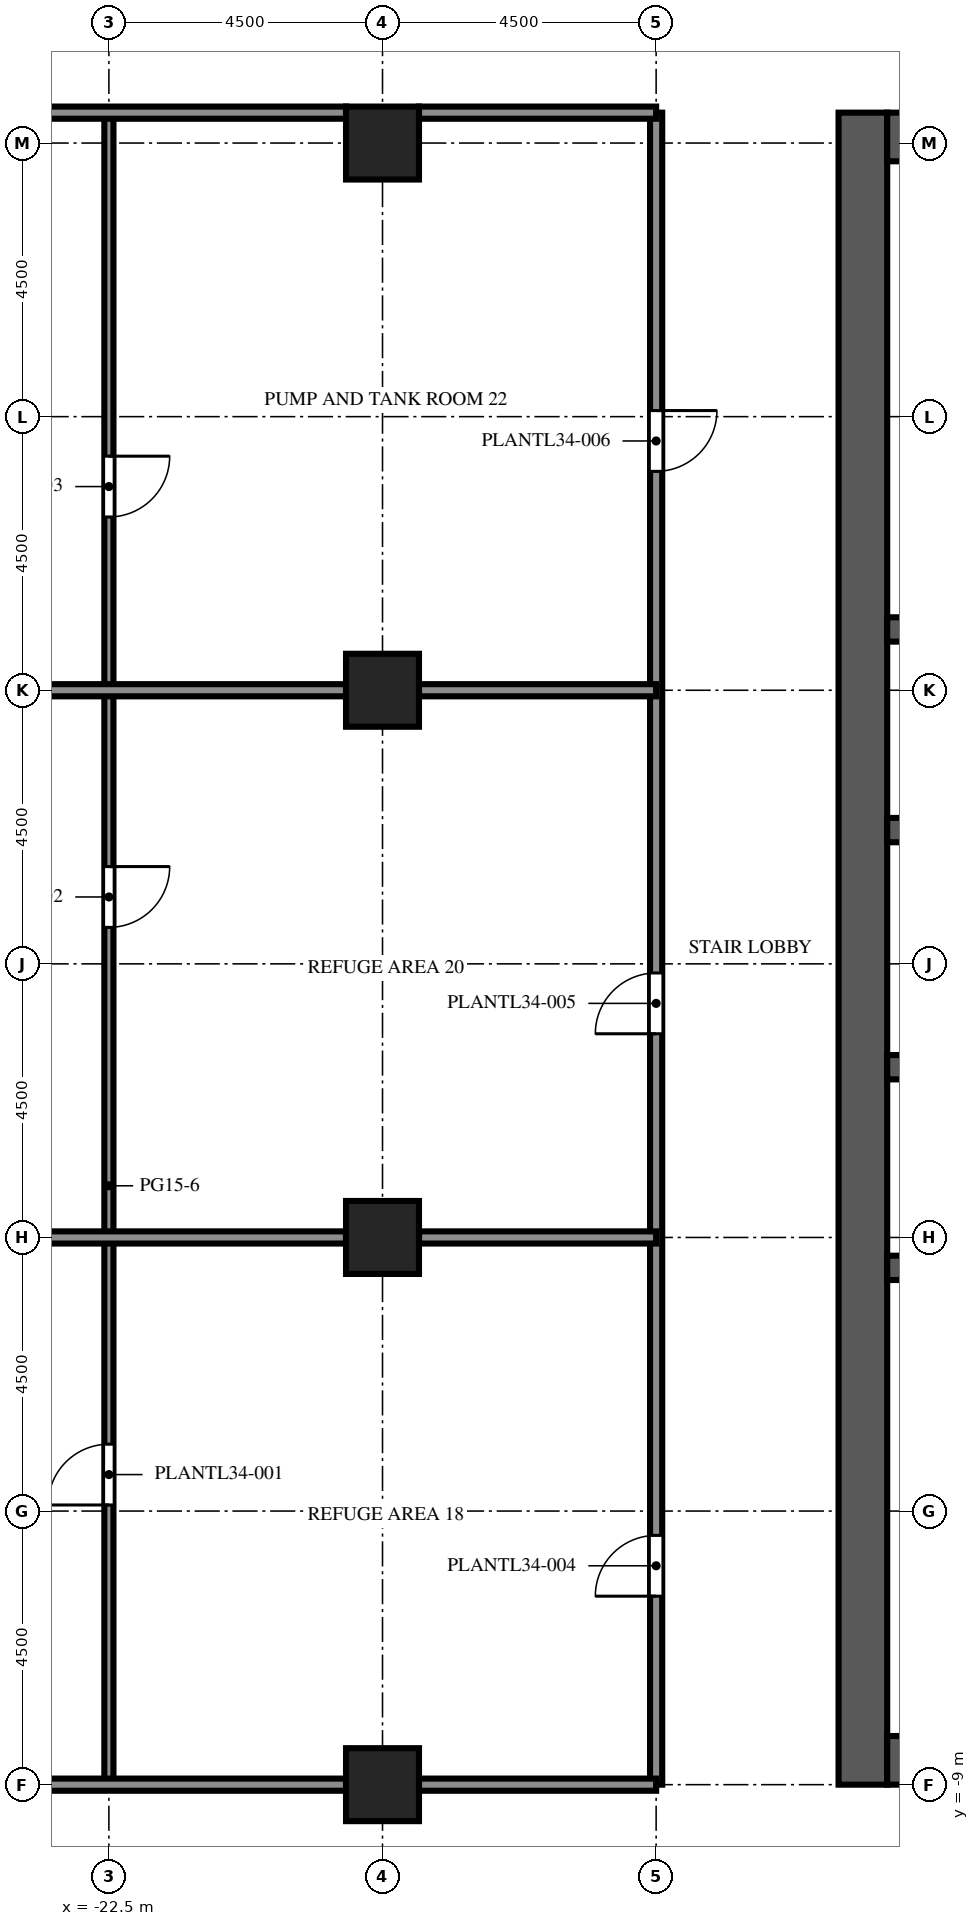
"""IFC4 building model, lengths in metres.
Left out: names, types, materials, properties, quantities, classifications, styles, units other than length and angle.
Written with IfcOpenShell. Run it as: python <this file> out.ifc"""

import sys

from ifc_helpers import new_model, si_unit, direction, frame, frame_2d, origin, origin_2d, place, context, subcontext, project, spatial, rectangle, extrude, element, fill, save


model = new_model("IFC4")
c1 = context("Model", 3, precision=1e-05, world=origin(), true_north=direction((0.0, 1.0)))
c2 = subcontext(c1, "Body", "Model", "MODEL_VIEW")
j1 = project(units=[si_unit("LENGTHUNIT", "METRE"), si_unit("PLANEANGLEUNIT", "RADIAN")], contexts=[c1])
p1 = place(None, origin())
s1 = spatial("IfcSite", under=j1, at=p1, CompositionType="ELEMENT")
p2 = place(p1, origin())
s2 = spatial("IfcBuilding", under=s1, at=p2, CompositionType="ELEMENT")
p3 = place(p2, frame((0.0, 0.0, 151.4)))
s3 = spatial("IfcBuildingStorey", under=s2, at=p3, CompositionType="ELEMENT", Elevation=151.4)
p4 = place(p3, frame((-18.0, -9.0, 0.0), z_axis=(0.0, 0.0, 1.0), x_axis=(1.0, 0.0, 0.0)))
e1 = element("IfcColumn", 1, at=p4, inside=s3, PredefinedType="COLUMN", context=c2, shape_type="SweptSolid", body=[
    extrude(rectangle(XDim=1.2, YDim=1.2, at=origin_2d()), origin(), (0.0, 0.0, 1.0), 4.95),
])
for number, where, z_axis, x_axis in (
    (2, (-18.0, 0.0, 0.0), (0.0, 0.0, 1.0), (1.0, 0.0, 0.0)),
    (3, (-18.0, 9.0, 0.0), (0.0, 0.0, 1.0), (1.0, 0.0, 0.0)),
    (4, (-18.0, 18.0, 0.0), (0.0, 0.0, 1.0), (1.0, 0.0, 0.0)),
):
    element("IfcColumn", number, at=place(p3, frame(where, z_axis=z_axis, x_axis=x_axis)), inside=s3, PredefinedType="COLUMN", context=c2, shape_type="SweptSolid", body=[
        extrude(rectangle(XDim=1.2, YDim=1.2, at=origin_2d()), origin(), (0.0, 0.0, 1.0), 5.4),
    ])
p5 = place(p3, frame((-10.1, -9.0, 0.0), z_axis=(0.0, 0.0, 1.0), x_axis=(0.0, 1.0, 0.0)))
e5 = element("IfcWall", 5, at=p5, inside=s3, PredefinedType="SHEAR", context=c2, shape_type="SweptSolid", body=[
    extrude(rectangle(XDim=27.5, YDim=0.8, at=frame_2d((13.75, 0.0))), origin(), (0.0, 0.0, 1.0), 5.4),
])
p6 = place(p5, frame((12.55, 0.0, 0.0)))
e6 = element("IfcOpeningElement", 6, at=p6, cuts=e5, PredefinedType="OPENING", context=c2, shape_type="SweptSolid", body=[
    extrude(rectangle(XDim=2.4, YDim=2.4, at=frame_2d((1.2, 1.2))), frame((0.0, 0.41, 0.0), z_axis=(0.0, -1.0, 0.0), x_axis=(1.0, 0.0, 0.0)), (0.0, 0.0, 1.0), 0.82),
])
p7 = place(p5, frame((6.825, 0.0, 0.0)))
e7 = element("IfcOpeningElement", 7, at=p7, cuts=e5, PredefinedType="OPENING", context=c2, shape_type="SweptSolid", body=[
    extrude(rectangle(XDim=1.2, YDim=2.1, at=frame_2d((0.6, 1.05))), frame((0.0, 0.41, 0.0), z_axis=(0.0, -1.0, 0.0), x_axis=(1.0, 0.0, 0.0)), (0.0, 0.0, 1.0), 0.82),
])
p8 = place(p5, frame((19.475, 0.0, 0.0)))
e8 = element("IfcOpeningElement", 8, at=p8, cuts=e5, PredefinedType="OPENING", context=c2, shape_type="SweptSolid", body=[
    extrude(rectangle(XDim=1.2, YDim=2.1, at=frame_2d((0.6, 1.05))), frame((0.0, 0.41, 0.0), z_axis=(0.0, -1.0, 0.0), x_axis=(1.0, 0.0, 0.0)), (0.0, 0.0, 1.0), 0.82),
])
for number, where, z_axis, x_axis in (
    (9, (-9.7, -8.6, 0.0), (0.0, 0.0, 1.0), (1.0, 0.0, 0.0)),
    (10, (-9.7, 18.1, 0.0), (0.0, 0.0, 1.0), (1.0, 0.0, 0.0)),
):
    element("IfcWall", number, at=place(p3, frame(where, z_axis=z_axis, x_axis=x_axis)), inside=s3, PredefinedType="SHEAR", context=c2, shape_type="SweptSolid", body=[
        extrude(rectangle(XDim=10.4, YDim=0.8, at=frame_2d((5.2, 0.0))), origin(), (0.0, 0.0, 1.0), 5.4),
    ])
p9 = place(p3, frame((-9.7, -0.5, 0.0), z_axis=(0.0, 0.0, 1.0), x_axis=(1.0, 0.0, 0.0)))
e11 = element("IfcWall", 11, at=p9, inside=s3, PredefinedType="SHEAR", context=c2, shape_type="SweptSolid", body=[
    extrude(rectangle(XDim=10.4, YDim=0.4, at=frame_2d((5.2, 0.0))), origin(), (0.0, 0.0, 1.0), 5.4),
])
p10 = place(p3, frame((-9.7, 2.8, 0.0), z_axis=(0.0, 0.0, 1.0), x_axis=(1.0, 0.0, 0.0)))
e12 = element("IfcWall", 12, at=p10, inside=s3, PredefinedType="SHEAR", context=c2, shape_type="SweptSolid", body=[
    extrude(rectangle(XDim=10.4, YDim=0.4, at=frame_2d((5.2, 0.0))), origin(), (0.0, 0.0, 1.0), 5.4),
])
p11 = place(p10, frame((0.738, 0.0, 0.0)))
e13 = element("IfcOpeningElement", 13, at=p11, cuts=e12, PredefinedType="OPENING", context=c2, shape_type="SweptSolid", body=[
    extrude(rectangle(XDim=1.1, YDim=2.1, at=frame_2d((0.55, 1.05))), frame((0.0, 0.21, 0.0), z_axis=(0.0, -1.0, 0.0), x_axis=(1.0, 0.0, 0.0)), (0.0, 0.0, 1.0), 0.42),
])
p12 = place(p10, frame((3.337, 0.0, 0.0)))
e14 = element("IfcOpeningElement", 14, at=p12, cuts=e12, PredefinedType="OPENING", context=c2, shape_type="SweptSolid", body=[
    extrude(rectangle(XDim=1.1, YDim=2.1, at=frame_2d((0.55, 1.05))), frame((0.0, 0.21, 0.0), z_axis=(0.0, -1.0, 0.0), x_axis=(1.0, 0.0, 0.0)), (0.0, 0.0, 1.0), 0.42),
])
p13 = place(p10, frame((5.962, 0.0, 0.0)))
e15 = element("IfcOpeningElement", 15, at=p13, cuts=e12, PredefinedType="OPENING", context=c2, shape_type="SweptSolid", body=[
    extrude(rectangle(XDim=1.1, YDim=2.1, at=frame_2d((0.55, 1.05))), frame((0.0, 0.21, 0.0), z_axis=(0.0, -1.0, 0.0), x_axis=(1.0, 0.0, 0.0)), (0.0, 0.0, 1.0), 0.42),
])
p14 = place(p10, frame((8.613, 0.0, 0.0)))
e16 = element("IfcOpeningElement", 16, at=p14, cuts=e12, PredefinedType="OPENING", context=c2, shape_type="SweptSolid", body=[
    extrude(rectangle(XDim=1.0, YDim=2.1, at=frame_2d((0.5, 1.05))), frame((0.0, 0.21, 0.0), z_axis=(0.0, -1.0, 0.0), x_axis=(1.0, 0.0, 0.0)), (0.0, 0.0, 1.0), 0.42),
])
p15 = place(p3, frame((-9.7, 6.7, 0.0), z_axis=(0.0, 0.0, 1.0), x_axis=(1.0, 0.0, 0.0)))
e17 = element("IfcWall", 17, at=p15, inside=s3, PredefinedType="SHEAR", context=c2, shape_type="SweptSolid", body=[
    extrude(rectangle(XDim=10.4, YDim=0.4, at=frame_2d((5.2, 0.0))), origin(), (0.0, 0.0, 1.0), 5.4),
])
p16 = place(p15, frame((3.337, 0.0, 0.0)))
e18 = element("IfcOpeningElement", 18, at=p16, cuts=e17, PredefinedType="OPENING", context=c2, shape_type="SweptSolid", body=[
    extrude(rectangle(XDim=1.1, YDim=2.1, at=frame_2d((0.55, 1.05))), frame((0.0, 0.21, 0.0), z_axis=(0.0, -1.0, 0.0), x_axis=(1.0, 0.0, 0.0)), (0.0, 0.0, 1.0), 0.42),
])
p17 = place(p15, frame((5.962, 0.0, 0.0)))
e19 = element("IfcOpeningElement", 19, at=p17, cuts=e17, PredefinedType="OPENING", context=c2, shape_type="SweptSolid", body=[
    extrude(rectangle(XDim=1.1, YDim=2.1, at=frame_2d((0.55, 1.05))), frame((0.0, 0.21, 0.0), z_axis=(0.0, -1.0, 0.0), x_axis=(1.0, 0.0, 0.0)), (0.0, 0.0, 1.0), 0.42),
])
p18 = place(p15, frame((8.663, 0.0, 0.0)))
e20 = element("IfcOpeningElement", 20, at=p18, cuts=e17, PredefinedType="OPENING", context=c2, shape_type="SweptSolid", body=[
    extrude(rectangle(XDim=1.1, YDim=2.1, at=frame_2d((0.55, 1.05))), frame((0.0, 0.21, 0.0), z_axis=(0.0, -1.0, 0.0), x_axis=(1.0, 0.0, 0.0)), (0.0, 0.0, 1.0), 0.42),
])
p19 = place(p15, frame((0.688, 0.0, 0.0)))
e21 = element("IfcOpeningElement", 21, at=p19, cuts=e17, PredefinedType="OPENING", context=c2, shape_type="SweptSolid", body=[
    extrude(rectangle(XDim=1.0, YDim=2.1, at=frame_2d((0.5, 1.05))), frame((0.0, 0.21, 0.0), z_axis=(0.0, -1.0, 0.0), x_axis=(1.0, 0.0, 0.0)), (0.0, 0.0, 1.0), 0.42),
])
p20 = place(p3, frame((-9.7, 10.0, 0.0), z_axis=(0.0, 0.0, 1.0), x_axis=(1.0, 0.0, 0.0)))
e22 = element("IfcWall", 22, at=p20, inside=s3, PredefinedType="SHEAR", context=c2, shape_type="SweptSolid", body=[
    extrude(rectangle(XDim=10.4, YDim=0.4, at=frame_2d((5.2, 0.0))), origin(), (0.0, 0.0, 1.0), 5.4),
])
p21 = place(p3, frame((-22.5, -9.0, 0.0), z_axis=(0.0, 0.0, 1.0), x_axis=(0.0, 1.0, 0.0)))
e23 = element("IfcWall", 23, at=p21, inside=s3, PredefinedType="PARTITIONING", context=c2, shape_type="SweptSolid", body=[
    extrude(rectangle(XDim=27.5, YDim=0.15, at=frame_2d((13.75, 0.0))), origin(), (0.0, 0.0, 1.0), 4.95),
])
p22 = place(p21, frame((4.6, 0.0, 0.0)))
e24 = element("IfcOpeningElement", 24, at=p22, cuts=e23, PredefinedType="OPENING", context=c2, shape_type="SweptSolid", body=[
    extrude(rectangle(XDim=1.0, YDim=2.1, at=frame_2d((0.5, 1.05))), frame((0.0, 0.085, 0.0), z_axis=(0.0, -1.0, 0.0), x_axis=(1.0, 0.0, 0.0)), (0.0, 0.0, 1.0), 0.17),
])
p23 = place(p21, frame((14.1, 0.0, 0.0)))
e25 = element("IfcOpeningElement", 25, at=p23, cuts=e23, PredefinedType="OPENING", context=c2, shape_type="SweptSolid", body=[
    extrude(rectangle(XDim=1.0, YDim=2.1, at=frame_2d((0.5, 1.05))), frame((0.0, 0.085, 0.0), z_axis=(0.0, -1.0, 0.0), x_axis=(1.0, 0.0, 0.0)), (0.0, 0.0, 1.0), 0.17),
])
p24 = place(p21, frame((20.85, 0.0, 0.0)))
e26 = element("IfcOpeningElement", 26, at=p24, cuts=e23, PredefinedType="OPENING", context=c2, shape_type="SweptSolid", body=[
    extrude(rectangle(XDim=1.0, YDim=2.1, at=frame_2d((0.5, 1.05))), frame((0.0, 0.085, 0.0), z_axis=(0.0, -1.0, 0.0), x_axis=(1.0, 0.0, 0.0)), (0.0, 0.0, 1.0), 0.17),
])
p25 = place(p3, frame((-13.5, -9.0, 0.0), z_axis=(0.0, 0.0, 1.0), x_axis=(0.0, 1.0, 0.0)))
e27 = element("IfcWall", 27, at=p25, inside=s3, PredefinedType="PARTITIONING", context=c2, shape_type="SweptSolid", body=[
    extrude(rectangle(XDim=27.5, YDim=0.2, at=frame_2d((13.75, 0.0))), origin(), (0.0, 0.0, 1.0), 4.95),
])
p26 = place(p25, frame((3.1, 0.0, 0.0)))
e28 = element("IfcOpeningElement", 28, at=p26, cuts=e27, PredefinedType="OPENING", context=c2, shape_type="SweptSolid", body=[
    extrude(rectangle(XDim=1.0, YDim=2.1, at=frame_2d((0.5, 1.05))), frame((0.0, 0.11, 0.0), z_axis=(0.0, -1.0, 0.0), x_axis=(1.0, 0.0, 0.0)), (0.0, 0.0, 1.0), 0.22),
])
p27 = place(p25, frame((12.35, 0.0, 0.0)))
e29 = element("IfcOpeningElement", 29, at=p27, cuts=e27, PredefinedType="OPENING", context=c2, shape_type="SweptSolid", body=[
    extrude(rectangle(XDim=1.0, YDim=2.1, at=frame_2d((0.5, 1.05))), frame((0.0, 0.11, 0.0), z_axis=(0.0, -1.0, 0.0), x_axis=(1.0, 0.0, 0.0)), (0.0, 0.0, 1.0), 0.22),
])
p28 = place(p25, frame((21.6, 0.0, 0.0)))
e30 = element("IfcOpeningElement", 30, at=p28, cuts=e27, PredefinedType="OPENING", context=c2, shape_type="SweptSolid", body=[
    extrude(rectangle(XDim=1.0, YDim=2.1, at=frame_2d((0.5, 1.05))), frame((0.0, 0.11, 0.0), z_axis=(0.0, -1.0, 0.0), x_axis=(1.0, 0.0, 0.0)), (0.0, 0.0, 1.0), 0.22),
])
p29 = place(p3, frame((-26.5, -9.0, 0.0), z_axis=(0.0, 0.0, 1.0), x_axis=(1.0, 0.0, 0.0)))
e31 = element("IfcWall", 31, at=p29, inside=s3, PredefinedType="PARTITIONING", context=c2, shape_type="SweptSolid", body=[
    extrude(rectangle(XDim=7.9, YDim=0.2, at=frame_2d((3.95, 0.0))), origin(), (0.0, 0.0, 1.0), 4.95),
])
p30 = place(p3, frame((-17.4, -9.0, 0.0), z_axis=(0.0, 0.0, 1.0), x_axis=(1.0, 0.0, 0.0)))
e32 = element("IfcWall", 32, at=p30, inside=s3, PredefinedType="PARTITIONING", context=c2, shape_type="SweptSolid", body=[
    extrude(rectangle(XDim=3.9, YDim=0.2, at=frame_2d((1.95, 0.0))), origin(), (0.0, 0.0, 1.0), 4.95),
])
p31 = place(p3, frame((-26.5, 0.0, 0.0), z_axis=(0.0, 0.0, 1.0), x_axis=(1.0, 0.0, 0.0)))
e33 = element("IfcWall", 33, at=p31, inside=s3, PredefinedType="PARTITIONING", context=c2, shape_type="SweptSolid", body=[
    extrude(rectangle(XDim=7.9, YDim=0.2, at=frame_2d((3.95, 0.0))), origin(), (0.0, 0.0, 1.0), 4.95),
])
p32 = place(p3, frame((-17.4, 0.0, 0.0), z_axis=(0.0, 0.0, 1.0), x_axis=(1.0, 0.0, 0.0)))
e34 = element("IfcWall", 34, at=p32, inside=s3, PredefinedType="PARTITIONING", context=c2, shape_type="SweptSolid", body=[
    extrude(rectangle(XDim=3.9, YDim=0.2, at=frame_2d((1.95, 0.0))), origin(), (0.0, 0.0, 1.0), 4.95),
])
p33 = place(p3, frame((-26.5, 9.0, 0.0), z_axis=(0.0, 0.0, 1.0), x_axis=(1.0, 0.0, 0.0)))
e35 = element("IfcWall", 35, at=p33, inside=s3, PredefinedType="PARTITIONING", context=c2, shape_type="SweptSolid", body=[
    extrude(rectangle(XDim=7.9, YDim=0.2, at=frame_2d((3.95, 0.0))), origin(), (0.0, 0.0, 1.0), 4.95),
])
p34 = place(p3, frame((-17.4, 9.0, 0.0), z_axis=(0.0, 0.0, 1.0), x_axis=(1.0, 0.0, 0.0)))
e36 = element("IfcWall", 36, at=p34, inside=s3, PredefinedType="PARTITIONING", context=c2, shape_type="SweptSolid", body=[
    extrude(rectangle(XDim=3.9, YDim=0.2, at=frame_2d((1.95, 0.0))), origin(), (0.0, 0.0, 1.0), 4.95),
])
p35 = place(p3, frame((-26.5, 18.5, 0.0), z_axis=(0.0, 0.0, 1.0), x_axis=(1.0, 0.0, 0.0)))
e37 = element("IfcWall", 37, at=p35, inside=s3, PredefinedType="PARTITIONING", context=c2, shape_type="SweptSolid", body=[
    extrude(rectangle(XDim=7.9, YDim=0.2, at=frame_2d((3.95, 0.0))), origin(), (0.0, 0.0, 1.0), 4.95),
])
p36 = place(p3, frame((-17.4, 18.5, 0.0), z_axis=(0.0, 0.0, 1.0), x_axis=(1.0, 0.0, 0.0)))
e38 = element("IfcWall", 38, at=p36, inside=s3, PredefinedType="PARTITIONING", context=c2, shape_type="SweptSolid", body=[
    extrude(rectangle(XDim=3.9, YDim=0.2, at=frame_2d((1.95, 0.0))), origin(), (0.0, 0.0, 1.0), 4.95),
])
p37 = place(p6, origin())
e39 = element("IfcDoor", 39, at=p37, inside=s3, OperationType="DOUBLE_DOOR_DOUBLE_SWING", PredefinedType="DOOR", context=c2, shape_type="SweptSolid", body=[
    extrude(rectangle(XDim=2.4, YDim=2.4, at=frame_2d((1.2, 1.2))), frame((0.0, 0.025, 0.0), z_axis=(0.0, -1.0, 0.0), x_axis=(1.0, 0.0, 0.0)), (0.0, 0.0, 1.0), 0.05),
])
fill(e6, e39)
p38 = place(p7, origin())
e40 = element("IfcDoor", 40, at=p38, inside=s3, OperationType="SINGLE_SWING_LEFT", PredefinedType="DOOR", context=c2, shape_type="SweptSolid", body=[
    extrude(rectangle(XDim=1.2, YDim=2.1, at=frame_2d((0.6, 1.05))), frame((0.0, 0.025, 0.0), z_axis=(0.0, -1.0, 0.0), x_axis=(1.0, 0.0, 0.0)), (0.0, 0.0, 1.0), 0.05),
])
fill(e7, e40)
p39 = place(p8, origin())
e41 = element("IfcDoor", 41, at=p39, inside=s3, OperationType="SINGLE_SWING_LEFT", PredefinedType="DOOR", context=c2, shape_type="SweptSolid", body=[
    extrude(rectangle(XDim=1.2, YDim=2.1, at=frame_2d((0.6, 1.05))), frame((0.0, 0.025, 0.0), z_axis=(0.0, -1.0, 0.0), x_axis=(1.0, 0.0, 0.0)), (0.0, 0.0, 1.0), 0.05),
])
fill(e8, e41)
p40 = place(p22, origin())
e42 = element("IfcDoor", 42, at=p40, inside=s3, OperationType="SINGLE_SWING_LEFT", PredefinedType="DOOR", context=c2, shape_type="SweptSolid", body=[
    extrude(rectangle(XDim=1.0, YDim=2.1, at=frame_2d((0.5, 1.05))), frame((0.0, 0.025, 0.0), z_axis=(0.0, -1.0, 0.0), x_axis=(1.0, 0.0, 0.0)), (0.0, 0.0, 1.0), 0.05),
])
fill(e24, e42)
p41 = place(p23, origin())
e43 = element("IfcDoor", 43, at=p41, inside=s3, OperationType="SINGLE_SWING_RIGHT", PredefinedType="DOOR", context=c2, shape_type="SweptSolid", body=[
    extrude(rectangle(XDim=1.0, YDim=2.1, at=frame_2d((0.5, 1.05))), frame((0.0, 0.025, 0.0), z_axis=(0.0, -1.0, 0.0), x_axis=(1.0, 0.0, 0.0)), (0.0, 0.0, 1.0), 0.05),
])
fill(e25, e43)
p42 = place(p24, origin())
e44 = element("IfcDoor", 44, at=p42, inside=s3, OperationType="SINGLE_SWING_RIGHT", PredefinedType="DOOR", context=c2, shape_type="SweptSolid", body=[
    extrude(rectangle(XDim=1.0, YDim=2.1, at=frame_2d((0.5, 1.05))), frame((0.0, 0.025, 0.0), z_axis=(0.0, -1.0, 0.0), x_axis=(1.0, 0.0, 0.0)), (0.0, 0.0, 1.0), 0.05),
])
fill(e26, e44)
p43 = place(p26, origin())
e45 = element("IfcDoor", 45, at=p43, inside=s3, OperationType="SINGLE_SWING_LEFT", PredefinedType="DOOR", context=c2, shape_type="SweptSolid", body=[
    extrude(rectangle(XDim=1.0, YDim=2.1, at=frame_2d((0.5, 1.05))), frame((0.0, 0.025, 0.0), z_axis=(0.0, -1.0, 0.0), x_axis=(1.0, 0.0, 0.0)), (0.0, 0.0, 1.0), 0.05),
])
fill(e28, e45)
p44 = place(p27, origin())
e46 = element("IfcDoor", 46, at=p44, inside=s3, OperationType="SINGLE_SWING_LEFT", PredefinedType="DOOR", context=c2, shape_type="SweptSolid", body=[
    extrude(rectangle(XDim=1.0, YDim=2.1, at=frame_2d((0.5, 1.05))), frame((0.0, 0.025, 0.0), z_axis=(0.0, -1.0, 0.0), x_axis=(1.0, 0.0, 0.0)), (0.0, 0.0, 1.0), 0.05),
])
fill(e29, e46)
p45 = place(p28, origin())
e47 = element("IfcDoor", 47, at=p45, inside=s3, OperationType="SINGLE_SWING_RIGHT", PredefinedType="DOOR", context=c2, shape_type="SweptSolid", body=[
    extrude(rectangle(XDim=1.0, YDim=2.1, at=frame_2d((0.5, 1.05))), frame((0.0, 0.025, 0.0), z_axis=(0.0, -1.0, 0.0), x_axis=(1.0, 0.0, 0.0)), (0.0, 0.0, 1.0), 0.05),
])
fill(e30, e47)
save(model, sys.argv[1])
